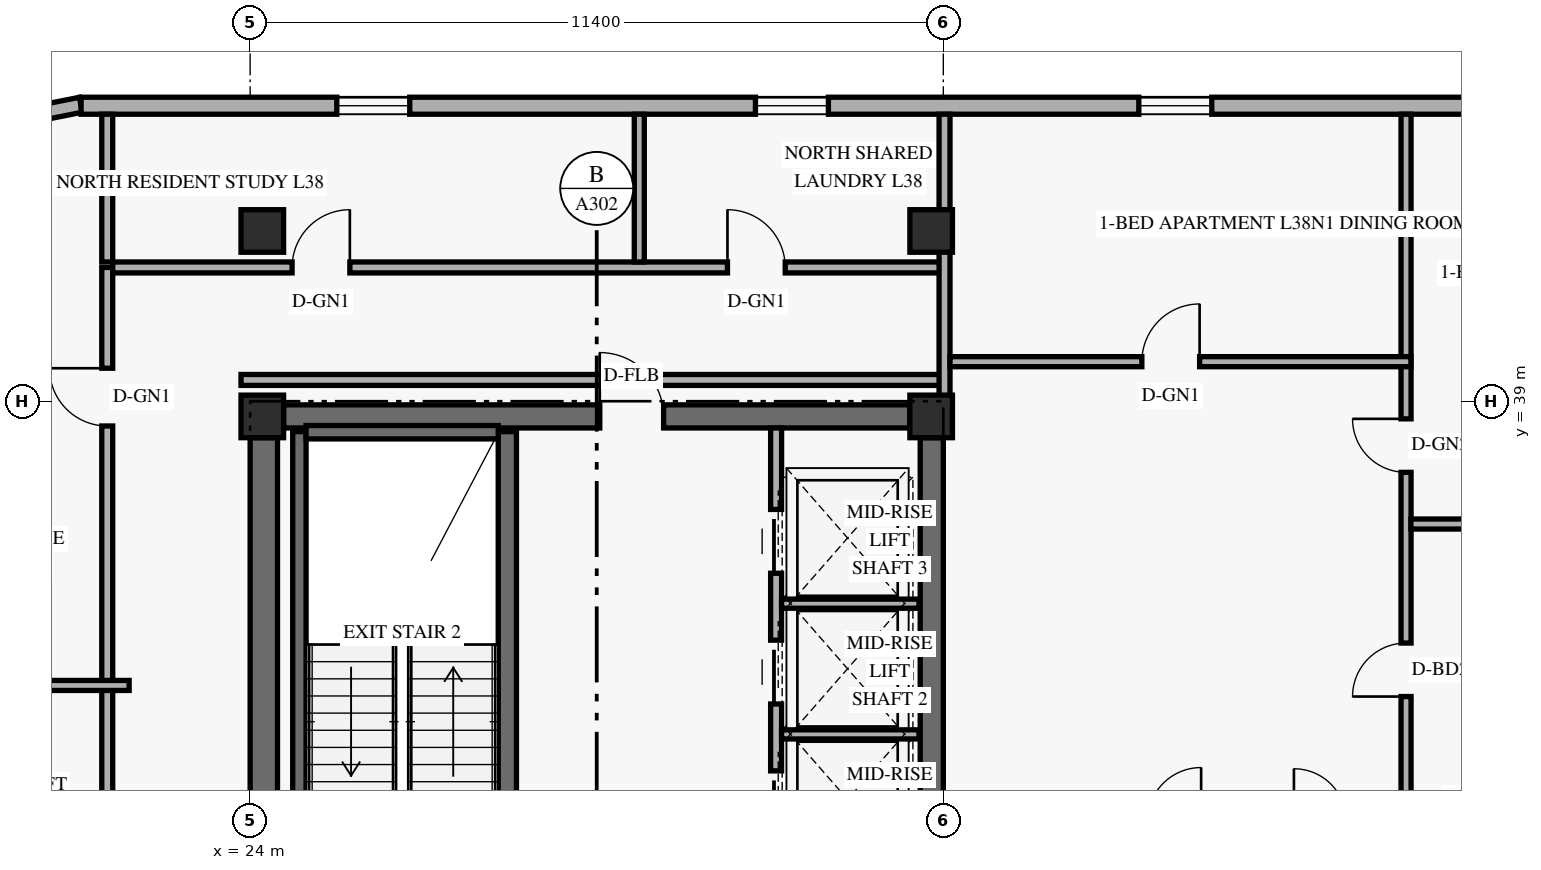
"""IFC4 building model, lengths in metres.
Left out: names, types, materials, properties, quantities, classifications, styles, units other than length and angle.
Written with IfcOpenShell. Run it as: python <this file> out.ifc"""

import sys

from ifc_helpers import new_model, si_unit, direction, frame, frame_2d, origin, origin_2d, place, context, subcontext, project, spatial, rectangle, extrude, element, fill, save


model = new_model("IFC4")
c1 = context("Model", 3, precision=1e-05, world=origin(), true_north=direction((0.0, 1.0)))
c2 = subcontext(c1, "Body", "Model", "MODEL_VIEW")
j1 = project(units=[si_unit("LENGTHUNIT", "METRE"), si_unit("PLANEANGLEUNIT", "RADIAN")], contexts=[c1])
p1 = place(None, origin())
s1 = spatial("IfcSite", under=j1, at=p1, CompositionType="ELEMENT")
p2 = place(p1, origin())
s2 = spatial("IfcBuilding", under=s1, at=p2, CompositionType="ELEMENT")
p3 = place(p2, frame((0.0, 0.0, 148.2)))
s3 = spatial("IfcBuildingStorey", under=s2, at=p3, CompositionType="ELEMENT", Elevation=148.2)
p4 = place(p3, frame((24.225, 30.55, 0.0), z_axis=(0.0, 0.0, 1.0), x_axis=(0.0, 1.0, 0.0)))
e1 = element("IfcWall", 1, at=p4, inside=s3, PredefinedType="SHEAR", context=c2, shape_type="SweptSolid", body=[
    extrude(rectangle(XDim=7.85, YDim=0.45, at=frame_2d((3.925, 0.0))), origin(), (0.0, 0.0, 1.0), 2.748),
])
p5 = place(p3, frame((35.21, 31.35, 0.0), z_axis=(0.0, 0.0, 1.0), x_axis=(0.0, 1.0, 0.0)))
e2 = element("IfcWall", 2, at=p5, inside=s3, PredefinedType="SHEAR", context=c2, shape_type="SweptSolid", body=[
    extrude(rectangle(XDim=7.05, YDim=0.38, at=frame_2d((3.525, 0.0))), origin(), (0.0, 0.0, 1.0), 2.748),
])
p6 = place(p3, frame((24.55, 38.75, 0.0), z_axis=(0.0, 0.0, 1.0), x_axis=(1.0, 0.0, 0.0)))
e3 = element("IfcWall", 3, at=p6, inside=s3, PredefinedType="SHEAR", context=c2, shape_type="SweptSolid", body=[
    extrude(rectangle(XDim=10.3, YDim=0.38, at=frame_2d((5.15, 0.0))), origin(), (0.0, 0.0, 1.0), 3.36),
])
p7 = place(p6, frame((5.2, 0.0, 0.0)))
e4 = element("IfcOpeningElement", 4, at=p7, cuts=e3, PredefinedType="OPENING", context=c2, shape_type="SweptSolid", body=[
    extrude(rectangle(XDim=1.05, YDim=2.15, at=frame_2d((0.525, 1.075))), frame((0.0, 0.2, 0.0), z_axis=(0.0, -1.0, 0.0), x_axis=(1.0, 0.0, 0.0)), (0.0, 0.0, 1.0), 0.4),
])
p8 = place(p3, frame((24.81, 30.74, 0.0), z_axis=(0.0, 0.0, 1.0), x_axis=(0.0, 1.0, 0.0)))
e5 = element("IfcWall", 5, at=p8, inside=s3, PredefinedType="SHEAR", context=c2, shape_type="SweptSolid", body=[
    extrude(rectangle(XDim=7.76, YDim=0.22, at=frame_2d((3.88, 0.0))), origin(), (0.0, 0.0, 1.0), 3.36),
])
p9 = place(p3, frame((28.23, 30.74, 0.0), z_axis=(0.0, 0.0, 1.0), x_axis=(0.0, 1.0, 0.0)))
e6 = element("IfcWall", 6, at=p9, inside=s3, PredefinedType="SHEAR", context=c2, shape_type="SweptSolid", body=[
    extrude(rectangle(XDim=7.76, YDim=0.3, at=frame_2d((3.88, 0.0))), origin(), (0.0, 0.0, 1.0), 3.36),
])
p10 = place(p3, frame((24.92, 38.49, 0.0), z_axis=(0.0, 0.0, 1.0), x_axis=(1.0, 0.0, 0.0)))
e7 = element("IfcWall", 7, at=p10, inside=s3, PredefinedType="SHEAR", context=c2, shape_type="SweptSolid", body=[
    extrude(rectangle(XDim=3.16, YDim=0.22, at=frame_2d((1.58, 0.0))), origin(), (0.0, 0.0, 1.0), 3.36),
])
for number, where, z_axis, x_axis in (
    (8, (24.2, 38.75, 0.0), (0.0, 0.0, 1.0), (1.0, 0.0, 0.0)),
    (9, (24.2, 41.8, 0.0), (0.0, 0.0, 1.0), (1.0, 0.0, 0.0)),
    (10, (35.2, 38.75, 0.0), (0.0, 0.0, 1.0), (1.0, 0.0, 0.0)),
    (11, (35.2, 41.8, 0.0), (0.0, 0.0, 1.0), (1.0, 0.0, 0.0)),
):
    element("IfcColumn", number, at=place(p3, frame(where, z_axis=z_axis, x_axis=x_axis)), inside=s3, PredefinedType="COLUMN", context=c2, shape_type="SweptSolid", body=[
        extrude(rectangle(XDim=0.7, YDim=0.7, at=origin_2d()), origin(), (0.0, 0.0, 1.0), 3.6),
    ])
p11 = place(p3, frame((21.217, 43.876, 0.0), z_axis=(0.0, 0.0, 1.0), x_axis=(-0.980809899341, -0.19496651342, 0.0)))
e12 = element("IfcWall", 12, at=p11, inside=s3, PredefinedType="SOLIDWALL", context=c2, shape_type="SweptSolid", body=[
    extrude(rectangle(XDim=1.389, YDim=0.25, at=frame_2d((0.694, 0.0))), origin(), (0.0, 0.0, 1.0), 3.36),
])
p12 = place(p3, frame((54.98, 43.86, 0.0), z_axis=(0.0, 0.0, 1.0), x_axis=(-1.0, 0.0, 0.0)))
e13 = element("IfcWall", 13, at=p12, inside=s3, PredefinedType="SOLIDWALL", context=c2, shape_type="SweptSolid", body=[
    extrude(rectangle(XDim=33.76, YDim=0.28, at=frame_2d((16.88, 0.0))), origin(), (0.0, 0.0, 1.0), 3.36),
])
p13 = place(p12, frame((28.355, 0.0, 0.85)))
e14 = element("IfcOpeningElement", 14, at=p13, cuts=e13, PredefinedType="OPENING", context=c2, shape_type="SweptSolid", body=[
    extrude(rectangle(XDim=1.2, YDim=1.5, at=frame_2d((0.6, 0.75))), frame((0.0, 0.15, 0.0), z_axis=(0.0, -1.0, 0.0), x_axis=(1.0, 0.0, 0.0)), (0.0, 0.0, 1.0), 0.3),
])
p14 = place(p12, frame((21.47, 0.0, 0.85)))
e15 = element("IfcOpeningElement", 15, at=p14, cuts=e13, PredefinedType="OPENING", context=c2, shape_type="SweptSolid", body=[
    extrude(rectangle(XDim=1.2, YDim=1.5, at=frame_2d((0.6, 0.75))), frame((0.0, 0.15, 0.0), z_axis=(0.0, -1.0, 0.0), x_axis=(1.0, 0.0, 0.0)), (0.0, 0.0, 1.0), 0.3),
])
p15 = place(p12, frame((15.165, 0.0, 0.85)))
e16 = element("IfcOpeningElement", 16, at=p15, cuts=e13, PredefinedType="OPENING", context=c2, shape_type="SweptSolid", body=[
    extrude(rectangle(XDim=1.2, YDim=1.5, at=frame_2d((0.6, 0.75))), frame((0.0, 0.15, 0.0), z_axis=(0.0, -1.0, 0.0), x_axis=(1.0, 0.0, 0.0)), (0.0, 0.0, 1.0), 0.3),
])
p16 = place(p12, frame((8.875, 0.0, 0.85)))
e17 = element("IfcOpeningElement", 17, at=p16, cuts=e13, PredefinedType="OPENING", context=c2, shape_type="SweptSolid", body=[
    extrude(rectangle(XDim=1.2, YDim=1.5, at=frame_2d((0.6, 0.75))), frame((0.0, 0.15, 0.0), z_axis=(0.0, -1.0, 0.0), x_axis=(1.0, 0.0, 0.0)), (0.0, 0.0, 1.0), 0.3),
])
p17 = place(p12, frame((5.48, 0.0, 0.85)))
e18 = element("IfcOpeningElement", 18, at=p17, cuts=e13, PredefinedType="OPENING", context=c2, shape_type="SweptSolid", body=[
    extrude(rectangle(XDim=1.2, YDim=1.5, at=frame_2d((0.6, 0.75))), frame((0.0, 0.15, 0.0), z_axis=(0.0, -1.0, 0.0), x_axis=(1.0, 0.0, 0.0)), (0.0, 0.0, 1.0), 0.3),
])
p18 = place(p12, frame((1.99, 0.0, 0.85)))
e19 = element("IfcOpeningElement", 19, at=p18, cuts=e13, PredefinedType="OPENING", context=c2, shape_type="SweptSolid", body=[
    extrude(rectangle(XDim=1.2, YDim=1.5, at=frame_2d((0.6, 0.75))), frame((0.0, 0.15, 0.0), z_axis=(0.0, -1.0, 0.0), x_axis=(1.0, 0.0, 0.0)), (0.0, 0.0, 1.0), 0.3),
])
p19 = place(p3, frame((32.65, 31.35, 0.0), z_axis=(0.0, 0.0, 1.0), x_axis=(0.0, 1.0, 0.0)))
e20 = element("IfcWall", 20, at=p19, inside=s3, PredefinedType="STANDARD", context=c2, shape_type="SweptSolid", body=[
    extrude(rectangle(XDim=7.21, YDim=0.18, at=frame_2d((3.605, 0.0))), origin(), (0.0, 0.0, 1.0), 3.36),
])
p20 = place(p19, frame((0.52, 0.0, 0.0)))
e21 = element("IfcOpeningElement", 21, at=p20, cuts=e20, PredefinedType="OPENING", context=c2, shape_type="SweptSolid", body=[
    extrude(rectangle(XDim=1.05, YDim=2.2, at=frame_2d((0.525, 1.1))), frame((0.0, 0.1, 0.0), z_axis=(0.0, -1.0, 0.0), x_axis=(1.0, 0.0, 0.0)), (0.0, 0.0, 1.0), 0.2),
])
p21 = place(p19, frame((2.67, 0.0, 0.0)))
e22 = element("IfcOpeningElement", 22, at=p21, cuts=e20, PredefinedType="OPENING", context=c2, shape_type="SweptSolid", body=[
    extrude(rectangle(XDim=1.05, YDim=2.2, at=frame_2d((0.525, 1.1))), frame((0.0, 0.1, 0.0), z_axis=(0.0, -1.0, 0.0), x_axis=(1.0, 0.0, 0.0)), (0.0, 0.0, 1.0), 0.2),
])
p22 = place(p19, frame((4.82, 0.0, 0.0)))
e23 = element("IfcOpeningElement", 23, at=p22, cuts=e20, PredefinedType="OPENING", context=c2, shape_type="SweptSolid", body=[
    extrude(rectangle(XDim=1.05, YDim=2.2, at=frame_2d((0.525, 1.1))), frame((0.0, 0.1, 0.0), z_axis=(0.0, -1.0, 0.0), x_axis=(1.0, 0.0, 0.0)), (0.0, 0.0, 1.0), 0.2),
])
for number, where, z_axis, x_axis in (
    (24, (32.74, 33.52, 0.0), (0.0, 0.0, 1.0), (1.0, 0.0, 0.0)),
    (25, (32.74, 35.67, 0.0), (0.0, 0.0, 1.0), (1.0, 0.0, 0.0)),
):
    element("IfcWall", number, at=place(p3, frame(where, z_axis=z_axis, x_axis=x_axis)), inside=s3, PredefinedType="STANDARD", context=c2, shape_type="SweptSolid", body=[
        extrude(rectangle(XDim=2.26, YDim=0.15, at=frame_2d((1.13, 0.0))), origin(), (0.0, 0.0, 1.0), 3.36),
    ])
p23 = place(p3, frame((21.65, 6.8, 0.0), z_axis=(0.0, 0.0, 1.0), x_axis=(0.0, 1.0, 0.0)))
e26 = element("IfcWall", 26, at=p23, inside=s3, PredefinedType="STANDARD", context=c2, shape_type="SweptSolid", body=[
    extrude(rectangle(XDim=34.4, YDim=0.18, at=frame_2d((17.2, 0.0))), origin(), (0.0, 0.0, 1.0), 2.73),
])
p24 = place(p23, frame((1.883, 0.0, 0.0)))
e27 = element("IfcOpeningElement", 27, at=p24, cuts=e26, PredefinedType="OPENING", context=c2, shape_type="SweptSolid", body=[
    extrude(rectangle(XDim=0.95, YDim=2.15, at=frame_2d((0.475, 1.075))), frame((0.0, 0.1, 0.0), z_axis=(0.0, -1.0, 0.0), x_axis=(1.0, 0.0, 0.0)), (0.0, 0.0, 1.0), 0.2),
])
p25 = place(p23, frame((12.117, 0.0, 0.0)))
e28 = element("IfcOpeningElement", 28, at=p25, cuts=e26, PredefinedType="OPENING", context=c2, shape_type="SweptSolid", body=[
    extrude(rectangle(XDim=0.95, YDim=2.15, at=frame_2d((0.475, 1.075))), frame((0.0, 0.1, 0.0), z_axis=(0.0, -1.0, 0.0), x_axis=(1.0, 0.0, 0.0)), (0.0, 0.0, 1.0), 0.2),
])
p26 = place(p23, frame((22.357, 0.0, 0.0)))
e29 = element("IfcOpeningElement", 29, at=p26, cuts=e26, PredefinedType="OPENING", context=c2, shape_type="SweptSolid", body=[
    extrude(rectangle(XDim=0.95, YDim=2.15, at=frame_2d((0.475, 1.075))), frame((0.0, 0.1, 0.0), z_axis=(0.0, -1.0, 0.0), x_axis=(1.0, 0.0, 0.0)), (0.0, 0.0, 1.0), 0.2),
])
p27 = place(p23, frame((31.792, 0.0, 0.0)))
e30 = element("IfcOpeningElement", 30, at=p27, cuts=e26, PredefinedType="OPENING", context=c2, shape_type="SweptSolid", body=[
    extrude(rectangle(XDim=0.95, YDim=2.15, at=frame_2d((0.475, 1.075))), frame((0.0, 0.1, 0.0), z_axis=(0.0, -1.0, 0.0), x_axis=(1.0, 0.0, 0.0)), (0.0, 0.0, 1.0), 0.2),
])
p28 = place(p3, frame((21.74, 41.2, 0.0), z_axis=(0.0, 0.0, 1.0), x_axis=(1.0, 0.0, 0.0)))
e31 = element("IfcWall", 31, at=p28, inside=s3, PredefinedType="STANDARD", context=c2, shape_type="SweptSolid", body=[
    extrude(rectangle(XDim=13.68, YDim=0.18, at=frame_2d((6.84, 0.0))), origin(), (0.0, 0.0, 1.0), 2.73),
])
p29 = place(p28, frame((2.95, 0.0, 0.0)))
e32 = element("IfcOpeningElement", 32, at=p29, cuts=e31, PredefinedType="OPENING", context=c2, shape_type="SweptSolid", body=[
    extrude(rectangle(XDim=0.95, YDim=2.15, at=frame_2d((0.475, 1.075))), frame((0.0, 0.1, 0.0), z_axis=(0.0, -1.0, 0.0), x_axis=(1.0, 0.0, 0.0)), (0.0, 0.0, 1.0), 0.2),
])
p30 = place(p28, frame((10.11, 0.0, 0.0)))
e33 = element("IfcOpeningElement", 33, at=p30, cuts=e31, PredefinedType="OPENING", context=c2, shape_type="SweptSolid", body=[
    extrude(rectangle(XDim=0.95, YDim=2.15, at=frame_2d((0.475, 1.075))), frame((0.0, 0.1, 0.0), z_axis=(0.0, -1.0, 0.0), x_axis=(1.0, 0.0, 0.0)), (0.0, 0.0, 1.0), 0.2),
])
p31 = place(p3, frame((23.85, 39.35, 0.0), z_axis=(0.0, 0.0, 1.0), x_axis=(1.0, 0.0, 0.0)))
e34 = element("IfcWall", 34, at=p31, inside=s3, PredefinedType="STANDARD", context=c2, shape_type="SweptSolid", body=[
    extrude(rectangle(XDim=11.57, YDim=0.18, at=frame_2d((5.785, 0.0))), origin(), (0.0, 0.0, 1.0), 2.73),
])
p32 = place(p3, frame((21.65, 41.29, 0.0), z_axis=(0.0, 0.0, 1.0), x_axis=(0.0, 1.0, 0.0)))
e35 = element("IfcWall", 35, at=p32, inside=s3, PredefinedType="PARTITIONING", context=c2, shape_type="SweptSolid", body=[
    extrude(rectangle(XDim=2.43, YDim=0.18, at=frame_2d((1.215, 0.0))), origin(), (0.0, 0.0, 1.0), 2.879),
])
p33 = place(p3, frame((35.42, 38.75, 0.0), z_axis=(0.0, 0.0, 1.0), x_axis=(0.0, 1.0, 0.0)))
e36 = element("IfcWall", 36, at=p33, inside=s3, PredefinedType="PARTITIONING", context=c2, shape_type="SweptSolid", body=[
    extrude(rectangle(XDim=4.97, YDim=0.18, at=frame_2d((2.485, 0.0))), origin(), (0.0, 0.0, 1.0), 2.73),
])
p34 = place(p3, frame((43.01, 29.55, 0.0), z_axis=(0.0, 0.0, 1.0), x_axis=(0.0, 1.0, 0.0)))
e37 = element("IfcWall", 37, at=p34, inside=s3, PredefinedType="PARTITIONING", context=c2, shape_type="SweptSolid", body=[
    extrude(rectangle(XDim=14.17, YDim=0.165, at=frame_2d((7.085, 0.0))), origin(), (0.0, 0.0, 1.0), 2.73),
])
p35 = place(p34, frame((4.593, 0.0, 0.0)))
e38 = element("IfcOpeningElement", 38, at=p35, cuts=e37, PredefinedType="OPENING", context=c2, shape_type="SweptSolid", body=[
    extrude(rectangle(XDim=0.88, YDim=2.14, at=frame_2d((0.44, 1.07))), frame((0.0, 0.093, 0.0), z_axis=(0.0, -1.0, 0.0), x_axis=(1.0, 0.0, 0.0)), (0.0, 0.0, 1.0), 0.185),
])
p36 = place(p34, frame((8.28, 0.0, 0.0)))
e39 = element("IfcOpeningElement", 39, at=p36, cuts=e37, PredefinedType="OPENING", context=c2, shape_type="SweptSolid", body=[
    extrude(rectangle(XDim=0.88, YDim=2.12, at=frame_2d((0.44, 1.06))), frame((0.0, 0.093, 0.0), z_axis=(0.0, -1.0, 0.0), x_axis=(1.0, 0.0, 0.0)), (0.0, 0.0, 1.0), 0.185),
])
p37 = place(p3, frame((35.51, 39.65, 0.0), z_axis=(0.0, 0.0, 1.0), x_axis=(1.0, 0.0, 0.0)))
e40 = element("IfcWall", 40, at=p37, inside=s3, PredefinedType="PARTITIONING", context=c2, shape_type="SweptSolid", body=[
    extrude(rectangle(XDim=7.58, YDim=0.165, at=frame_2d((3.79, 0.0))), origin(), (0.0, 0.0, 1.0), 3.36),
])
p38 = place(p37, frame((3.155, 0.0, 0.0)))
e41 = element("IfcOpeningElement", 41, at=p38, cuts=e40, PredefinedType="OPENING", context=c2, shape_type="SweptSolid", body=[
    extrude(rectangle(XDim=0.95, YDim=2.15, at=frame_2d((0.475, 1.075))), frame((0.0, 0.093, 0.0), z_axis=(0.0, -1.0, 0.0), x_axis=(1.0, 0.0, 0.0)), (0.0, 0.0, 1.0), 0.185),
])
p39 = place(p3, frame((43.09, 36.98, 0.0), z_axis=(0.0, 0.0, 1.0), x_axis=(1.0, 0.0, 0.0)))
e42 = element("IfcWall", 42, at=p39, inside=s3, PredefinedType="PARTITIONING", context=c2, shape_type="SweptSolid", body=[
    extrude(rectangle(XDim=4.82, YDim=0.165, at=frame_2d((2.41, 0.0))), origin(), (0.0, 0.0, 1.0), 2.73),
])
p40 = place(p3, frame((17.88, 34.325, 0.0), z_axis=(0.0, 0.0, 1.0), x_axis=(1.0, 0.0, 0.0)))
e43 = element("IfcWall", 43, at=p40, inside=s3, PredefinedType="PARTITIONING", context=c2, shape_type="SweptSolid", body=[
    extrude(rectangle(XDim=4.13, YDim=0.165, at=frame_2d((2.065, 0.0))), origin(), (0.0, 0.0, 1.0), 2.879),
])
p41 = place(p3, frame((30.4, 41.29, 0.0), z_axis=(0.0, 0.0, 1.0), x_axis=(0.0, 1.0, 0.0)))
e44 = element("IfcWall", 44, at=p41, inside=s3, PredefinedType="PARTITIONING", context=c2, shape_type="SweptSolid", body=[
    extrude(rectangle(XDim=2.43, YDim=0.165, at=frame_2d((1.215, 0.0))), origin(), (0.0, 0.0, 1.0), 2.879),
])
p42 = place(p13, origin())
e45 = element("IfcWindow", 45, at=p42, inside=s3, PartitioningType="SINGLE_PANEL", PredefinedType="WINDOW", context=c2, shape_type="SweptSolid", body=[
    extrude(rectangle(XDim=1.2, YDim=1.5, at=frame_2d((0.6, 0.75))), frame((0.0, 0.03, 0.0), z_axis=(0.0, -1.0, 0.0), x_axis=(1.0, 0.0, 0.0)), (0.0, 0.0, 1.0), 0.06),
])
fill(e14, e45)
p43 = place(p14, origin())
e46 = element("IfcWindow", 46, at=p43, inside=s3, PartitioningType="SINGLE_PANEL", PredefinedType="WINDOW", context=c2, shape_type="SweptSolid", body=[
    extrude(rectangle(XDim=1.2, YDim=1.5, at=frame_2d((0.6, 0.75))), frame((0.0, 0.03, 0.0), z_axis=(0.0, -1.0, 0.0), x_axis=(1.0, 0.0, 0.0)), (0.0, 0.0, 1.0), 0.06),
])
fill(e15, e46)
p44 = place(p15, origin())
e47 = element("IfcWindow", 47, at=p44, inside=s3, PartitioningType="SINGLE_PANEL", PredefinedType="WINDOW", context=c2, shape_type="SweptSolid", body=[
    extrude(rectangle(XDim=1.2, YDim=1.5, at=frame_2d((0.6, 0.75))), frame((0.0, 0.03, 0.0), z_axis=(0.0, -1.0, 0.0), x_axis=(1.0, 0.0, 0.0)), (0.0, 0.0, 1.0), 0.06),
])
fill(e16, e47)
p45 = place(p20, origin())
e48 = element("IfcDoor", 48, at=p45, inside=s3, OperationType="SLIDING_TO_LEFT", PredefinedType="DOOR", context=c2, shape_type="SweptSolid", body=[
    extrude(rectangle(XDim=1.05, YDim=2.2, at=frame_2d((0.525, 1.1))), frame((0.0, 0.025, 0.0), z_axis=(0.0, -1.0, 0.0), x_axis=(1.0, 0.0, 0.0)), (0.0, 0.0, 1.0), 0.05),
])
fill(e21, e48)
p46 = place(p21, origin())
e49 = element("IfcDoor", 49, at=p46, inside=s3, OperationType="SLIDING_TO_LEFT", PredefinedType="DOOR", context=c2, shape_type="SweptSolid", body=[
    extrude(rectangle(XDim=1.05, YDim=2.2, at=frame_2d((0.525, 1.1))), frame((0.0, 0.025, 0.0), z_axis=(0.0, -1.0, 0.0), x_axis=(1.0, 0.0, 0.0)), (0.0, 0.0, 1.0), 0.05),
])
fill(e22, e49)
p47 = place(p22, origin())
e50 = element("IfcDoor", 50, at=p47, inside=s3, OperationType="SLIDING_TO_LEFT", PredefinedType="DOOR", context=c2, shape_type="SweptSolid", body=[
    extrude(rectangle(XDim=1.05, YDim=2.2, at=frame_2d((0.525, 1.1))), frame((0.0, 0.025, 0.0), z_axis=(0.0, -1.0, 0.0), x_axis=(1.0, 0.0, 0.0)), (0.0, 0.0, 1.0), 0.05),
])
fill(e23, e50)
p48 = place(p7, frame((1.05, 0.0, 0.0), z_axis=(0.0, 0.0, 1.0), x_axis=(-1.0, 0.0, 0.0)))
e51 = element("IfcDoor", 51, at=p48, inside=s3, OperationType="SINGLE_SWING_RIGHT", PredefinedType="DOOR", context=c2, shape_type="SweptSolid", body=[
    extrude(rectangle(XDim=1.05, YDim=2.15, at=frame_2d((0.525, 1.075))), frame((0.0, 0.025, 0.0), z_axis=(0.0, -1.0, 0.0), x_axis=(1.0, 0.0, 0.0)), (0.0, 0.0, 1.0), 0.05),
])
fill(e4, e51)
p49 = place(p38, origin())
e52 = element("IfcDoor", 52, at=p49, inside=s3, OperationType="SINGLE_SWING_RIGHT", PredefinedType="DOOR", context=c2, shape_type="SweptSolid", body=[
    extrude(rectangle(XDim=0.95, YDim=2.15, at=frame_2d((0.475, 1.075))), frame((0.0, 0.025, 0.0), z_axis=(0.0, -1.0, 0.0), x_axis=(1.0, 0.0, 0.0)), (0.0, 0.0, 1.0), 0.05),
])
fill(e41, e52)
p50 = place(p35, origin())
e53 = element("IfcDoor", 53, at=p50, inside=s3, OperationType="SINGLE_SWING_LEFT", PredefinedType="DOOR", context=c2, shape_type="SweptSolid", body=[
    extrude(rectangle(XDim=0.88, YDim=2.14, at=frame_2d((0.44, 1.07))), frame((0.0, 0.025, 0.0), z_axis=(0.0, -1.0, 0.0), x_axis=(1.0, 0.0, 0.0)), (0.0, 0.0, 1.0), 0.05),
])
fill(e38, e53)
p51 = place(p36, origin())
e54 = element("IfcDoor", 54, at=p51, inside=s3, OperationType="SINGLE_SWING_RIGHT", PredefinedType="DOOR", context=c2, shape_type="SweptSolid", body=[
    extrude(rectangle(XDim=0.88, YDim=2.12, at=frame_2d((0.44, 1.06))), frame((0.0, 0.025, 0.0), z_axis=(0.0, -1.0, 0.0), x_axis=(1.0, 0.0, 0.0)), (0.0, 0.0, 1.0), 0.05),
])
fill(e39, e54)
p52 = place(p27, origin())
e55 = element("IfcDoor", 55, at=p52, inside=s3, OperationType="SINGLE_SWING_RIGHT", PredefinedType="DOOR", context=c2, shape_type="SweptSolid", body=[
    extrude(rectangle(XDim=0.95, YDim=2.15, at=frame_2d((0.475, 1.075))), frame((0.0, 0.025, 0.0), z_axis=(0.0, -1.0, 0.0), x_axis=(1.0, 0.0, 0.0)), (0.0, 0.0, 1.0), 0.05),
])
fill(e30, e55)
p53 = place(p29, origin())
e56 = element("IfcDoor", 56, at=p53, inside=s3, OperationType="SINGLE_SWING_RIGHT", PredefinedType="DOOR", context=c2, shape_type="SweptSolid", body=[
    extrude(rectangle(XDim=0.95, YDim=2.15, at=frame_2d((0.475, 1.075))), frame((0.0, 0.025, 0.0), z_axis=(0.0, -1.0, 0.0), x_axis=(1.0, 0.0, 0.0)), (0.0, 0.0, 1.0), 0.05),
])
fill(e32, e56)
p54 = place(p30, origin())
e57 = element("IfcDoor", 57, at=p54, inside=s3, OperationType="SINGLE_SWING_LEFT", PredefinedType="DOOR", context=c2, shape_type="SweptSolid", body=[
    extrude(rectangle(XDim=0.95, YDim=2.15, at=frame_2d((0.475, 1.075))), frame((0.0, 0.025, 0.0), z_axis=(0.0, -1.0, 0.0), x_axis=(1.0, 0.0, 0.0)), (0.0, 0.0, 1.0), 0.05),
])
fill(e33, e57)
save(model, sys.argv[1])
